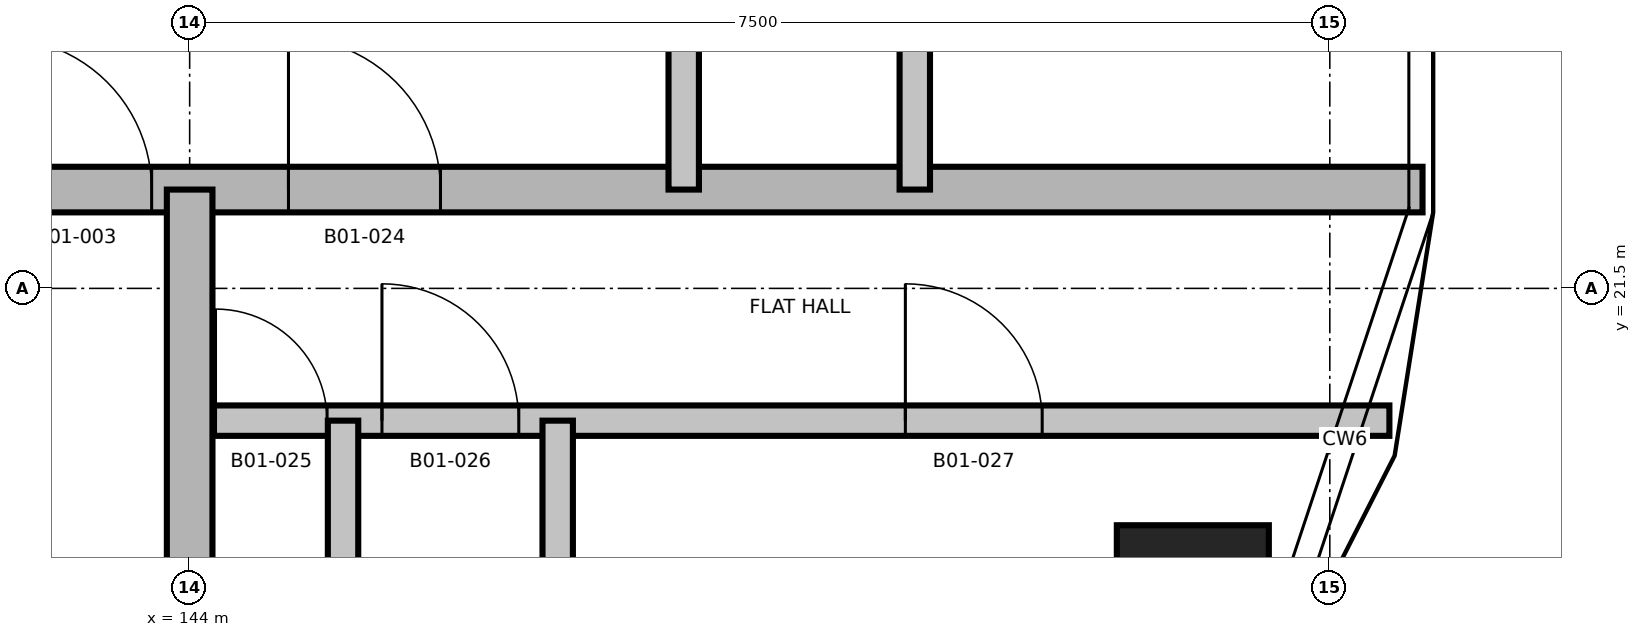
"""IFC4 building model, lengths in metres.
Left out: names, types, materials, properties, quantities, classifications, styles, units other than length and angle.
Written with IfcOpenShell. Run it as: python <this file> out.ifc"""

import sys

from ifc_helpers import new_model, si_unit, direction, frame, frame_2d, origin, origin_2d, place, context, subcontext, project, spatial, rectangle, extrude, element, fill, save


model = new_model("IFC4")
c1 = context("Model", 3, precision=1e-05, world=origin(), true_north=direction((0.0, 1.0)))
c2 = subcontext(c1, "Body", "Model", "MODEL_VIEW")
j1 = project(units=[si_unit("LENGTHUNIT", "METRE"), si_unit("PLANEANGLEUNIT", "RADIAN")], contexts=[c1])
p1 = place(None, origin())
s1 = spatial("IfcSite", under=j1, at=p1, CompositionType="ELEMENT")
p2 = place(p1, origin())
s2 = spatial("IfcBuilding", under=s1, at=p2, CompositionType="ELEMENT")
p3 = place(p2, frame((0.0, 0.0, 37.2)))
s3 = spatial("IfcBuildingStorey", under=s2, at=p3, CompositionType="ELEMENT", Elevation=37.2)
p4 = place(p3, frame((150.599, 19.442, 0.0), z_axis=(0.0, 0.0, 1.0), x_axis=(1.0, 0.0, 0.0)))
e1 = element("IfcColumn", 1, at=p4, inside=s3, PredefinedType="COLUMN", context=c2, shape_type="SweptSolid", body=[
    extrude(rectangle(XDim=1.0, YDim=1.0, at=origin_2d()), origin(), (0.0, 0.0, 1.0), 3.7),
])
p5 = place(p3, frame((144.0, 20.63, 0.0), z_axis=(0.0, 0.0, 1.0), x_axis=(1.0, 0.0, 0.0)))
e2 = element("IfcWall", 2, at=p5, inside=s3, PredefinedType="PARTITIONING", context=c2, shape_type="SweptSolid", body=[
    extrude(rectangle(XDim=7.892, YDim=0.2, at=frame_2d((3.946, 0.0))), origin(), (0.0, 0.0, 1.0), 3.4),
])
p6 = place(p5, frame((0.17, 0.0, 0.0)))
e3 = element("IfcOpeningElement", 3, at=p6, cuts=e2, PredefinedType="OPENING", context=c2, shape_type="SweptSolid", body=[
    extrude(rectangle(XDim=0.734, YDim=2.1, at=frame_2d((0.367, 1.05))), frame((0.0, 0.11, 0.0), z_axis=(0.0, -1.0, 0.0), x_axis=(1.0, 0.0, 0.0)), (0.0, 0.0, 1.0), 0.22),
])
p7 = place(p5, frame((1.265, 0.0, 0.0)))
e4 = element("IfcOpeningElement", 4, at=p7, cuts=e2, PredefinedType="OPENING", context=c2, shape_type="SweptSolid", body=[
    extrude(rectangle(XDim=0.9, YDim=2.1, at=frame_2d((0.45, 1.05))), frame((0.0, 0.11, 0.0), z_axis=(0.0, -1.0, 0.0), x_axis=(1.0, 0.0, 0.0)), (0.0, 0.0, 1.0), 0.22),
])
p8 = place(p5, frame((4.708, 0.0, 0.0)))
e5 = element("IfcOpeningElement", 5, at=p8, cuts=e2, PredefinedType="OPENING", context=c2, shape_type="SweptSolid", body=[
    extrude(rectangle(XDim=0.9, YDim=2.1, at=frame_2d((0.45, 1.05))), frame((0.0, 0.11, 0.0), z_axis=(0.0, -1.0, 0.0), x_axis=(1.0, 0.0, 0.0)), (0.0, 0.0, 1.0), 0.22),
])
p9 = place(p3, frame((120.89, 22.15, 0.0), z_axis=(0.0, 0.0, 1.0), x_axis=(1.0, 0.0, 0.0)))
e6 = element("IfcWall", 6, at=p9, inside=s3, PredefinedType="SHEAR", context=c2, shape_type="SweptSolid", body=[
    extrude(rectangle(XDim=31.22, YDim=0.3, at=frame_2d((15.61, 0.0))), origin(), (0.0, 0.0, 1.0), 3.4),
])
p10 = place(p9, frame((21.86, 0.0, 0.0)))
e7 = element("IfcOpeningElement", 7, at=p10, cuts=e6, PredefinedType="OPENING", context=c2, shape_type="SweptSolid", body=[
    extrude(rectangle(XDim=1.0, YDim=2.1, at=frame_2d((0.5, 1.05))), frame((0.0, 0.16, 0.0), z_axis=(0.0, -1.0, 0.0), x_axis=(1.0, 0.0, 0.0)), (0.0, 0.0, 1.0), 0.32),
])
p11 = place(p9, frame((6.46, 0.0, 0.0)))
e8 = element("IfcOpeningElement", 8, at=p11, cuts=e6, PredefinedType="OPENING", context=c2, shape_type="SweptSolid", body=[
    extrude(rectangle(XDim=1.0, YDim=2.1, at=frame_2d((0.5, 1.05))), frame((0.0, 0.16, 0.0), z_axis=(0.0, -1.0, 0.0), x_axis=(1.0, 0.0, 0.0)), (0.0, 0.0, 1.0), 0.32),
])
p12 = place(p9, frame((11.36, 0.0, 0.0)))
e9 = element("IfcOpeningElement", 9, at=p12, cuts=e6, PredefinedType="OPENING", context=c2, shape_type="SweptSolid", body=[
    extrude(rectangle(XDim=1.0, YDim=2.1, at=frame_2d((0.5, 1.05))), frame((0.0, 0.16, 0.0), z_axis=(0.0, -1.0, 0.0), x_axis=(1.0, 0.0, 0.0)), (0.0, 0.0, 1.0), 0.32),
])
p13 = place(p9, frame((23.76, 0.0, 0.0)))
e10 = element("IfcOpeningElement", 10, at=p13, cuts=e6, PredefinedType="OPENING", context=c2, shape_type="SweptSolid", body=[
    extrude(rectangle(XDim=1.0, YDim=2.1, at=frame_2d((0.5, 1.05))), frame((0.0, 0.16, 0.0), z_axis=(0.0, -1.0, 0.0), x_axis=(1.0, 0.0, 0.0)), (0.0, 0.0, 1.0), 0.32),
])
p14 = place(p9, frame((15.86, 0.0, 0.0)))
e11 = element("IfcOpeningElement", 11, at=p14, cuts=e6, PredefinedType="OPENING", context=c2, shape_type="SweptSolid", body=[
    extrude(rectangle(XDim=0.9, YDim=2.1, at=frame_2d((0.45, 1.05))), frame((0.0, 0.16, 0.0), z_axis=(0.0, -1.0, 0.0), x_axis=(1.0, 0.0, 0.0)), (0.0, 0.0, 1.0), 0.32),
])
p15 = place(p3, frame((144.0, 16.89, 0.0), z_axis=(0.0, 0.0, 1.0), x_axis=(0.0, 1.0, 0.0)))
e12 = element("IfcWall", 12, at=p15, inside=s3, PredefinedType="SHEAR", context=c2, shape_type="SweptSolid", body=[
    extrude(rectangle(XDim=5.26, YDim=0.3, at=frame_2d((2.63, 0.0))), origin(), (0.0, 0.0, 1.0), 3.4),
])
for number, where, z_axis, x_axis in (
    (13, (145.009, 16.89, 0.0), (0.0, 0.0, 1.0), (0.0, 1.0, 0.0)),
    (14, (146.421, 16.89, 0.0), (0.0, 0.0, 1.0), (0.0, 1.0, 0.0)),
):
    element("IfcWall", number, at=place(p3, frame(where, z_axis=z_axis, x_axis=x_axis)), inside=s3, PredefinedType="PARTITIONING", context=c2, shape_type="SweptSolid", body=[
        extrude(rectangle(XDim=3.74, YDim=0.2, at=frame_2d((1.87, 0.0))), origin(), (0.0, 0.0, 1.0), 3.4),
    ])
p16 = place(p3, frame((147.25, 22.15, 0.0), z_axis=(0.0, 0.0, 1.0), x_axis=(0.0, 1.0, 0.0)))
e15 = element("IfcWall", 15, at=p16, inside=s3, PredefinedType="PARTITIONING", context=c2, shape_type="SweptSolid", body=[
    extrude(rectangle(XDim=17.7, YDim=0.2, at=frame_2d((8.85, 0.0))), origin(), (0.0, 0.0, 1.0), 3.4),
])
p17 = place(p16, frame((2.65, 0.0, 0.0)))
e16 = element("IfcOpeningElement", 16, at=p17, cuts=e15, PredefinedType="OPENING", context=c2, shape_type="SweptSolid", body=[
    extrude(rectangle(XDim=1.0, YDim=2.1, at=frame_2d((0.5, 1.05))), frame((0.0, 0.11, 0.0), z_axis=(0.0, -1.0, 0.0), x_axis=(1.0, 0.0, 0.0)), (0.0, 0.0, 1.0), 0.22),
])
p18 = place(p3, frame((148.77, 22.15, 0.0), z_axis=(0.0, 0.0, 1.0), x_axis=(0.0, 1.0, 0.0)))
e17 = element("IfcWall", 17, at=p18, inside=s3, PredefinedType="PARTITIONING", context=c2, shape_type="SweptSolid", body=[
    extrude(rectangle(XDim=17.7, YDim=0.2, at=frame_2d((8.85, 0.0))), origin(), (0.0, 0.0, 1.0), 3.4),
])
p19 = place(p18, frame((1.725, 0.0, 0.0)))
e18 = element("IfcOpeningElement", 18, at=p19, cuts=e17, PredefinedType="OPENING", context=c2, shape_type="SweptSolid", body=[
    extrude(rectangle(XDim=0.9, YDim=2.1, at=frame_2d((0.45, 1.05))), frame((0.0, 0.11, 0.0), z_axis=(0.0, -1.0, 0.0), x_axis=(1.0, 0.0, 0.0)), (0.0, 0.0, 1.0), 0.22),
])
p20 = place(p18, frame((6.195, 0.0, 0.0)))
e19 = element("IfcOpeningElement", 19, at=p20, cuts=e17, PredefinedType="OPENING", context=c2, shape_type="SweptSolid", body=[
    extrude(rectangle(XDim=0.9, YDim=2.1, at=frame_2d((0.45, 1.05))), frame((0.0, 0.11, 0.0), z_axis=(0.0, -1.0, 0.0), x_axis=(1.0, 0.0, 0.0)), (0.0, 0.0, 1.0), 0.22),
])
p21 = place(p18, frame((9.641, 0.0, 0.0)))
e20 = element("IfcOpeningElement", 20, at=p21, cuts=e17, PredefinedType="OPENING", context=c2, shape_type="SweptSolid", body=[
    extrude(rectangle(XDim=0.9, YDim=2.1, at=frame_2d((0.45, 1.05))), frame((0.0, 0.11, 0.0), z_axis=(0.0, -1.0, 0.0), x_axis=(1.0, 0.0, 0.0)), (0.0, 0.0, 1.0), 0.22),
])
p22 = place(p18, frame((11.895, 0.0, 0.0)))
e21 = element("IfcOpeningElement", 21, at=p22, cuts=e17, PredefinedType="OPENING", context=c2, shape_type="SweptSolid", body=[
    extrude(rectangle(XDim=0.8, YDim=2.1, at=frame_2d((0.4, 1.05))), frame((0.0, 0.11, 0.0), z_axis=(0.0, -1.0, 0.0), x_axis=(1.0, 0.0, 0.0)), (0.0, 0.0, 1.0), 0.22),
])
p23 = place(p18, frame((14.378, 0.0, 0.0)))
e22 = element("IfcOpeningElement", 22, at=p23, cuts=e17, PredefinedType="OPENING", context=c2, shape_type="SweptSolid", body=[
    extrude(rectangle(XDim=0.9, YDim=2.1, at=frame_2d((0.45, 1.05))), frame((0.0, 0.11, 0.0), z_axis=(0.0, -1.0, 0.0), x_axis=(1.0, 0.0, 0.0)), (0.0, 0.0, 1.0), 0.22),
])
p24 = place(p18, frame((16.603, 0.0, 0.0)))
e23 = element("IfcOpeningElement", 23, at=p24, cuts=e17, PredefinedType="OPENING", context=c2, shape_type="SweptSolid", body=[
    extrude(rectangle(XDim=0.8, YDim=2.1, at=frame_2d((0.4, 1.05))), frame((0.0, 0.11, 0.0), z_axis=(0.0, -1.0, 0.0), x_axis=(1.0, 0.0, 0.0)), (0.0, 0.0, 1.0), 0.22),
])
p25 = place(p10, origin())
e24 = element("IfcDoor", 24, at=p25, inside=s3, OperationType="SINGLE_SWING_LEFT", PredefinedType="DOOR", context=c2, shape_type="SweptSolid", body=[
    extrude(rectangle(XDim=1.0, YDim=2.1, at=frame_2d((0.5, 1.05))), frame((0.0, 0.025, 0.0), z_axis=(0.0, -1.0, 0.0), x_axis=(1.0, 0.0, 0.0)), (0.0, 0.0, 1.0), 0.05),
])
fill(e7, e24)
p26 = place(p13, origin())
e25 = element("IfcDoor", 25, at=p26, inside=s3, OperationType="SINGLE_SWING_RIGHT", PredefinedType="DOOR", context=c2, shape_type="SweptSolid", body=[
    extrude(rectangle(XDim=1.0, YDim=2.1, at=frame_2d((0.5, 1.05))), frame((0.0, 0.025, 0.0), z_axis=(0.0, -1.0, 0.0), x_axis=(1.0, 0.0, 0.0)), (0.0, 0.0, 1.0), 0.05),
])
fill(e10, e25)
p27 = place(p6, origin())
e26 = element("IfcDoor", 26, at=p27, inside=s3, OperationType="SINGLE_SWING_LEFT", PredefinedType="DOOR", context=c2, shape_type="SweptSolid", body=[
    extrude(rectangle(XDim=0.734, YDim=2.1, at=frame_2d((0.367, 1.05))), frame((0.0, 0.025, 0.0), z_axis=(0.0, -1.0, 0.0), x_axis=(1.0, 0.0, 0.0)), (0.0, 0.0, 1.0), 0.05),
])
fill(e3, e26)
p28 = place(p7, origin())
e27 = element("IfcDoor", 27, at=p28, inside=s3, OperationType="SINGLE_SWING_RIGHT", PredefinedType="DOOR", context=c2, shape_type="SweptSolid", body=[
    extrude(rectangle(XDim=0.9, YDim=2.1, at=frame_2d((0.45, 1.05))), frame((0.0, 0.025, 0.0), z_axis=(0.0, -1.0, 0.0), x_axis=(1.0, 0.0, 0.0)), (0.0, 0.0, 1.0), 0.05),
])
fill(e4, e27)
p29 = place(p8, origin())
e28 = element("IfcDoor", 28, at=p29, inside=s3, OperationType="SINGLE_SWING_LEFT", PredefinedType="DOOR", context=c2, shape_type="SweptSolid", body=[
    extrude(rectangle(XDim=0.9, YDim=2.1, at=frame_2d((0.45, 1.05))), frame((0.0, 0.025, 0.0), z_axis=(0.0, -1.0, 0.0), x_axis=(1.0, 0.0, 0.0)), (0.0, 0.0, 1.0), 0.05),
])
fill(e5, e28)
save(model, sys.argv[1])
